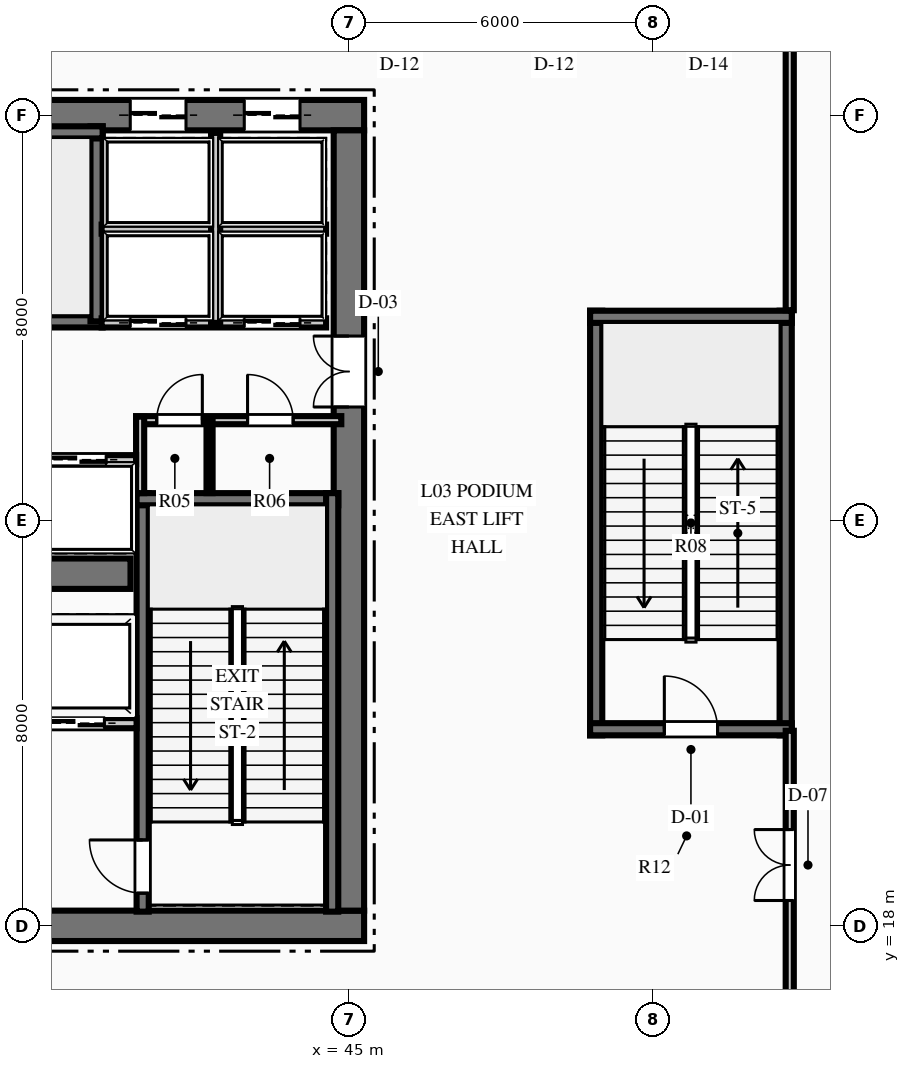
"""IFC4 building model, lengths in metres.
Left out: names, types, materials, properties, quantities, classifications, styles, units other than length and angle.
Written with IfcOpenShell. Run it as: python <this file> out.ifc"""

import sys

from ifc_helpers import new_model, si_unit, direction, frame, frame_2d, origin, place, context, subcontext, project, spatial, rectangle, extrude, element, fill, save


model = new_model("IFC4")
c1 = context("Model", 3, precision=1e-05, world=origin(), true_north=direction((0.0, 1.0)))
c2 = subcontext(c1, "Body", "Model", "MODEL_VIEW")
j1 = project(units=[si_unit("LENGTHUNIT", "METRE"), si_unit("PLANEANGLEUNIT", "RADIAN")], contexts=[c1])
p1 = place(None, origin())
s1 = spatial("IfcSite", under=j1, at=p1, CompositionType="ELEMENT")
p2 = place(p1, origin())
s2 = spatial("IfcBuilding", under=s1, at=p2, CompositionType="ELEMENT")
p3 = place(p2, frame((0.0, 0.0, 16.8)))
s3 = spatial("IfcBuildingStorey", under=s2, at=p3, CompositionType="ELEMENT", Elevation=16.8)
p4 = place(p3, frame((26.7, 18.0, 0.0), z_axis=(0.0, 0.0, 1.0), x_axis=(1.0, 0.0, 0.0)))
e1 = element("IfcWall", 1, at=p4, inside=s3, PredefinedType="SHEAR", context=c2, shape_type="SweptSolid", body=[
    extrude(rectangle(XDim=18.6, YDim=0.6, at=frame_2d((9.3, 0.0))), origin(), (0.0, 0.0, 1.0), 5.4),
])
p5 = place(p4, frame((7.4, 0.0, 0.0)))
e2 = element("IfcOpeningElement", 2, at=p5, cuts=e1, PredefinedType="OPENING", context=c2, shape_type="SweptSolid", body=[
    extrude(rectangle(XDim=1.1, YDim=2.15, at=frame_2d((0.55, 1.075))), frame((0.0, 0.31, 0.0), z_axis=(0.0, -1.0, 0.0), x_axis=(1.0, 0.0, 0.0)), (0.0, 0.0, 1.0), 0.62),
])
p6 = place(p4, frame((10.1, 0.0, 0.0)))
e3 = element("IfcOpeningElement", 3, at=p6, cuts=e1, PredefinedType="OPENING", context=c2, shape_type="SweptSolid", body=[
    extrude(rectangle(XDim=1.1, YDim=2.15, at=frame_2d((0.55, 1.075))), frame((0.0, 0.31, 0.0), z_axis=(0.0, -1.0, 0.0), x_axis=(1.0, 0.0, 0.0)), (0.0, 0.0, 1.0), 0.62),
])
p7 = place(p3, frame((26.7, 34.0, 0.0), z_axis=(0.0, 0.0, 1.0), x_axis=(1.0, 0.0, 0.0)))
e4 = element("IfcWall", 4, at=p7, inside=s3, PredefinedType="SHEAR", context=c2, shape_type="SweptSolid", body=[
    extrude(rectangle(XDim=18.6, YDim=0.6, at=frame_2d((9.3, 0.0))), origin(), (0.0, 0.0, 1.0), 5.4),
])
p8 = place(p7, frame((1.265, 0.0, 0.0)))
e5 = element("IfcOpeningElement", 5, at=p8, cuts=e4, PredefinedType="OPENING", context=c2, shape_type="SweptSolid", body=[
    extrude(rectangle(XDim=1.1, YDim=2.15, at=frame_2d((0.55, 1.075))), frame((0.0, 0.31, 0.0), z_axis=(0.0, -1.0, 0.0), x_axis=(1.0, 0.0, 0.0)), (0.0, 0.0, 1.0), 0.62),
])
p9 = place(p7, frame((3.515, 0.0, 0.0)))
e6 = element("IfcOpeningElement", 6, at=p9, cuts=e4, PredefinedType="OPENING", context=c2, shape_type="SweptSolid", body=[
    extrude(rectangle(XDim=1.1, YDim=2.15, at=frame_2d((0.55, 1.075))), frame((0.0, 0.31, 0.0), z_axis=(0.0, -1.0, 0.0), x_axis=(1.0, 0.0, 0.0)), (0.0, 0.0, 1.0), 0.62),
])
p10 = place(p7, frame((13.985, 0.0, 0.0)))
e7 = element("IfcOpeningElement", 7, at=p10, cuts=e4, PredefinedType="OPENING", context=c2, shape_type="SweptSolid", body=[
    extrude(rectangle(XDim=1.1, YDim=2.15, at=frame_2d((0.55, 1.075))), frame((0.0, 0.31, 0.0), z_axis=(0.0, -1.0, 0.0), x_axis=(1.0, 0.0, 0.0)), (0.0, 0.0, 1.0), 0.62),
])
p11 = place(p7, frame((16.235, 0.0, 0.0)))
e8 = element("IfcOpeningElement", 8, at=p11, cuts=e4, PredefinedType="OPENING", context=c2, shape_type="SweptSolid", body=[
    extrude(rectangle(XDim=1.1, YDim=2.15, at=frame_2d((0.55, 1.075))), frame((0.0, 0.31, 0.0), z_axis=(0.0, -1.0, 0.0), x_axis=(1.0, 0.0, 0.0)), (0.0, 0.0, 1.0), 0.62),
])
p12 = place(p3, frame((45.0, 18.3, 0.0), z_axis=(0.0, 0.0, 1.0), x_axis=(0.0, 1.0, 0.0)))
e9 = element("IfcWall", 9, at=p12, inside=s3, PredefinedType="SHEAR", context=c2, shape_type="SweptSolid", body=[
    extrude(rectangle(XDim=15.4, YDim=0.6, at=frame_2d((7.7, 0.0))), origin(), (0.0, 0.0, 1.0), 5.4),
])
p13 = place(p12, frame((9.94, 0.0, 0.0)))
e10 = element("IfcOpeningElement", 10, at=p13, cuts=e9, PredefinedType="OPENING", context=c2, shape_type="SweptSolid", body=[
    extrude(rectangle(XDim=1.4, YDim=2.2, at=frame_2d((0.7, 1.1))), frame((0.0, 0.31, 0.0), z_axis=(0.0, -1.0, 0.0), x_axis=(1.0, 0.0, 0.0)), (0.0, 0.0, 1.0), 0.62),
])
p14 = place(p3, frame((31.31, 24.95, 0.0), z_axis=(0.0, 0.0, 1.0), x_axis=(1.0, 0.0, 0.0)))
e11 = element("IfcWall", 11, at=p14, inside=s3, PredefinedType="SHEAR", context=c2, shape_type="SweptSolid", body=[
    extrude(rectangle(XDim=9.38, YDim=0.6, at=frame_2d((4.69, 0.0))), origin(), (0.0, 0.0, 1.0), 5.4),
])
p15 = place(p3, frame((40.93, 18.28, 0.0), z_axis=(0.0, 0.0, 1.0), x_axis=(0.0, 1.0, 0.0)))
e12 = element("IfcWall", 12, at=p15, inside=s3, PredefinedType="SHEAR", context=c2, shape_type="SweptSolid", body=[
    extrude(rectangle(XDim=8.26, YDim=0.24, at=frame_2d((4.13, 0.0))), origin(), (0.0, 0.0, 1.0), 5.4),
])
p16 = place(p15, frame((0.365, 0.0, 0.0)))
e13 = element("IfcOpeningElement", 13, at=p16, cuts=e12, PredefinedType="OPENING", context=c2, shape_type="SweptSolid", body=[
    extrude(rectangle(XDim=1.05, YDim=2.15, at=frame_2d((0.525, 1.075))), frame((0.0, 0.13, 0.0), z_axis=(0.0, -1.0, 0.0), x_axis=(1.0, 0.0, 0.0)), (0.0, 0.0, 1.0), 0.26),
])
p17 = place(p3, frame((40.81, 26.42, 0.0), z_axis=(0.0, 0.0, 1.0), x_axis=(1.0, 0.0, 0.0)))
e14 = element("IfcWall", 14, at=p17, inside=s3, PredefinedType="SHEAR", context=c2, shape_type="SweptSolid", body=[
    extrude(rectangle(XDim=3.98, YDim=0.24, at=frame_2d((1.99, 0.0))), origin(), (0.0, 0.0, 1.0), 5.4),
])
p18 = place(p3, frame((44.67, 18.28, 0.0), z_axis=(0.0, 0.0, 1.0), x_axis=(0.0, 1.0, 0.0)))
e15 = element("IfcWall", 15, at=p18, inside=s3, PredefinedType="SHEAR", context=c2, shape_type="SweptSolid", body=[
    extrude(rectangle(XDim=8.26, YDim=0.24, at=frame_2d((4.13, 0.0))), origin(), (0.0, 0.0, 1.0), 5.4),
])
p19 = place(p3, frame((31.76, 29.93, 0.0), z_axis=(0.0, 0.0, 1.0), x_axis=(1.0, 0.0, 0.0)))
e16 = element("IfcWall", 16, at=p19, inside=s3, PredefinedType="SHEAR", context=c2, shape_type="SweptSolid", body=[
    extrude(rectangle(XDim=8.38, YDim=0.24, at=frame_2d((4.19, 0.0))), origin(), (0.0, 0.0, 1.0), 5.4),
])
p20 = place(p19, frame((0.565, 0.0, 0.0)))
e17 = element("IfcOpeningElement", 17, at=p20, cuts=e16, PredefinedType="OPENING", context=c2, shape_type="SweptSolid", body=[
    extrude(rectangle(XDim=1.05, YDim=2.15, at=frame_2d((0.525, 1.075))), frame((0.0, 0.13, 0.0), z_axis=(0.0, -1.0, 0.0), x_axis=(1.0, 0.0, 0.0)), (0.0, 0.0, 1.0), 0.26),
])
p21 = place(p3, frame((40.02, 29.93, 0.0), z_axis=(0.0, 0.0, 1.0), x_axis=(0.0, 1.0, 0.0)))
e18 = element("IfcWall", 18, at=p21, inside=s3, PredefinedType="SHEAR", context=c2, shape_type="SweptSolid", body=[
    extrude(rectangle(XDim=3.85, YDim=0.24, at=frame_2d((1.925, 0.0))), origin(), (0.0, 0.0, 1.0), 5.4),
])
p22 = place(p3, frame((37.85, 33.66, 0.0), z_axis=(0.0, 0.0, 1.0), x_axis=(1.0, 0.0, 0.0)))
e19 = element("IfcWall", 19, at=p22, inside=s3, PredefinedType="SHEAR", context=c2, shape_type="SweptSolid", body=[
    extrude(rectangle(XDim=2.29, YDim=0.24, at=frame_2d((1.145, 0.0))), origin(), (0.0, 0.0, 1.0), 5.4),
])
for number, where, z_axis, x_axis in (
    (20, (49.88, 21.76, 0.0), (0.0, 0.0, 1.0), (0.0, 1.0, 0.0)),
    (21, (53.62, 21.76, 0.0), (0.0, 0.0, 1.0), (0.0, 1.0, 0.0)),
):
    element("IfcWall", number, at=place(p3, frame(where, z_axis=z_axis, x_axis=x_axis)), inside=s3, PredefinedType="SHEAR", context=c2, shape_type="SweptSolid", body=[
        extrude(rectangle(XDim=8.38, YDim=0.24, at=frame_2d((4.19, 0.0))), origin(), (0.0, 0.0, 1.0), 5.4),
    ])
p23 = place(p3, frame((49.76, 21.88, 0.0), z_axis=(0.0, 0.0, 1.0), x_axis=(1.0, 0.0, 0.0)))
e22 = element("IfcWall", 22, at=p23, inside=s3, PredefinedType="SHEAR", context=c2, shape_type="SweptSolid", body=[
    extrude(rectangle(XDim=3.98, YDim=0.24, at=frame_2d((1.99, 0.0))), origin(), (0.0, 0.0, 1.0), 5.4),
])
p24 = place(p23, frame((1.465, 0.0, 0.0)))
e23 = element("IfcOpeningElement", 23, at=p24, cuts=e22, PredefinedType="OPENING", context=c2, shape_type="SweptSolid", body=[
    extrude(rectangle(XDim=1.05, YDim=2.15, at=frame_2d((0.525, 1.075))), frame((0.0, 0.13, 0.0), z_axis=(0.0, -1.0, 0.0), x_axis=(1.0, 0.0, 0.0)), (0.0, 0.0, 1.0), 0.26),
])
p25 = place(p3, frame((49.76, 30.02, 0.0), z_axis=(0.0, 0.0, 1.0), x_axis=(1.0, 0.0, 0.0)))
e24 = element("IfcWall", 24, at=p25, inside=s3, PredefinedType="SHEAR", context=c2, shape_type="SweptSolid", body=[
    extrude(rectangle(XDim=3.98, YDim=0.24, at=frame_2d((1.99, 0.0))), origin(), (0.0, 0.0, 1.0), 5.4),
])
p26 = place(p3, frame((36.12, 22.0, 0.0), z_axis=(0.0, 0.0, 1.0), x_axis=(1.0, 0.0, 0.0)))
e25 = element("IfcWall", 25, at=p26, inside=s3, PredefinedType="PARTITIONING", context=c2, shape_type="SweptSolid", body=[
    extrude(rectangle(XDim=4.69, YDim=0.2, at=frame_2d((2.345, 0.0))), origin(), (0.0, 0.0, 1.0), 4.98),
])
p27 = place(p26, frame((2.955, 0.0, 0.0)))
e26 = element("IfcOpeningElement", 26, at=p27, cuts=e25, PredefinedType="OPENING", context=c2, shape_type="SweptSolid", body=[
    extrude(rectangle(XDim=1.1, YDim=2.15, at=frame_2d((0.55, 1.075))), frame((0.0, 0.11, 0.0), z_axis=(0.0, -1.0, 0.0), x_axis=(1.0, 0.0, 0.0)), (0.0, 0.0, 1.0), 0.22),
])
p28 = place(p26, frame((0.08, 0.0, 0.0)))
e27 = element("IfcOpeningElement", 27, at=p28, cuts=e25, PredefinedType="OPENING", context=c2, shape_type="SweptSolid", body=[
    extrude(rectangle(XDim=1.4, YDim=2.2, at=frame_2d((0.7, 1.1))), frame((0.0, 0.11, 0.0), z_axis=(0.0, -1.0, 0.0), x_axis=(1.0, 0.0, 0.0)), (0.0, 0.0, 1.0), 0.22),
])
p29 = place(p3, frame((40.8, 27.98, 0.0), z_axis=(0.0, 0.0, 1.0), x_axis=(1.0, 0.0, 0.0)))
e28 = element("IfcWall", 28, at=p29, inside=s3, PredefinedType="PARTITIONING", context=c2, shape_type="SweptSolid", body=[
    extrude(rectangle(XDim=4.05, YDim=0.16, at=frame_2d((2.025, 0.0))), origin(), (0.0, 0.0, 1.0), 4.98),
])
p30 = place(p29, frame((0.407, 0.0, 0.0)))
e29 = element("IfcOpeningElement", 29, at=p30, cuts=e28, PredefinedType="OPENING", context=c2, shape_type="SweptSolid", body=[
    extrude(rectangle(XDim=0.9, YDim=2.15, at=frame_2d((0.45, 1.075))), frame((0.0, 0.09, 0.0), z_axis=(0.0, -1.0, 0.0), x_axis=(1.0, 0.0, 0.0)), (0.0, 0.0, 1.0), 0.18),
])
p31 = place(p29, frame((2.2, 0.0, 0.0)))
e30 = element("IfcOpeningElement", 30, at=p31, cuts=e28, PredefinedType="OPENING", context=c2, shape_type="SweptSolid", body=[
    extrude(rectangle(XDim=0.9, YDim=2.15, at=frame_2d((0.45, 1.075))), frame((0.0, 0.09, 0.0), z_axis=(0.0, -1.0, 0.0), x_axis=(1.0, 0.0, 0.0)), (0.0, 0.0, 1.0), 0.18),
])
p32 = place(p3, frame((40.88, 26.54, 0.0), z_axis=(0.0, 0.0, 1.0), x_axis=(0.0, 1.0, 0.0)))
e31 = element("IfcWall", 31, at=p32, inside=s3, PredefinedType="PARTITIONING", context=c2, shape_type="SweptSolid", body=[
    extrude(rectangle(XDim=1.51, YDim=0.16, at=frame_2d((0.755, 0.0))), origin(), (0.0, 0.0, 1.0), 4.98),
])
p33 = place(p3, frame((42.25, 26.54, 0.0), z_axis=(0.0, 0.0, 1.0), x_axis=(0.0, 1.0, 0.0)))
e32 = element("IfcWall", 32, at=p33, inside=s3, PredefinedType="PARTITIONING", context=c2, shape_type="SweptSolid", body=[
    extrude(rectangle(XDim=1.44, YDim=0.12, at=frame_2d((0.72, 0.0))), origin(), (0.0, 0.0, 1.0), 4.98),
])
p34 = place(p3, frame((40.12, 29.9, 0.0), z_axis=(0.0, 0.0, 1.0), x_axis=(1.0, 0.0, 0.0)))
e33 = element("IfcWall", 33, at=p34, inside=s3, PredefinedType="PARTITIONING", context=c2, shape_type="SweptSolid", body=[
    extrude(rectangle(XDim=4.43, YDim=0.18, at=frame_2d((2.215, 0.0))), origin(), (0.0, 0.0, 1.0), 4.98),
])
p35 = place(p34, frame((0.565, 0.0, 0.0)))
e34 = element("IfcOpeningElement", 34, at=p35, cuts=e33, PredefinedType="OPENING", context=c2, shape_type="SweptSolid", body=[
    extrude(rectangle(XDim=1.1, YDim=2.15, at=frame_2d((0.55, 1.075))), frame((0.0, 0.1, 0.0), z_axis=(0.0, -1.0, 0.0), x_axis=(1.0, 0.0, 0.0)), (0.0, 0.0, 1.0), 0.2),
])
p36 = place(p34, frame((2.815, 0.0, 0.0)))
e35 = element("IfcOpeningElement", 35, at=p36, cuts=e33, PredefinedType="OPENING", context=c2, shape_type="SweptSolid", body=[
    extrude(rectangle(XDim=1.1, YDim=2.15, at=frame_2d((0.55, 1.075))), frame((0.0, 0.1, 0.0), z_axis=(0.0, -1.0, 0.0), x_axis=(1.0, 0.0, 0.0)), (0.0, 0.0, 1.0), 0.2),
])
p37 = place(p3, frame((40.12, 31.75, 0.0), z_axis=(0.0, 0.0, 1.0), x_axis=(1.0, 0.0, 0.0)))
e36 = element("IfcWall", 36, at=p37, inside=s3, PredefinedType="PARTITIONING", context=c2, shape_type="SweptSolid", body=[
    extrude(rectangle(XDim=4.43, YDim=0.18, at=frame_2d((2.215, 0.0))), origin(), (0.0, 0.0, 1.0), 4.98),
])
p38 = place(p3, frame((42.37, 29.9, 0.0), z_axis=(0.0, 0.0, 1.0), x_axis=(0.0, 1.0, 0.0)))
e37 = element("IfcWall", 37, at=p38, inside=s3, PredefinedType="PARTITIONING", context=c2, shape_type="SweptSolid", body=[
    extrude(rectangle(XDim=3.75, YDim=0.18, at=frame_2d((1.875, 0.0))), origin(), (0.0, 0.0, 1.0), 4.98),
])
p39 = place(p3, frame((31.2, 27.2, 0.0), z_axis=(0.0, 0.0, 1.0), x_axis=(1.0, 0.0, 0.0)))
e38 = element("IfcWall", 38, at=p39, inside=s3, PredefinedType="PARTITIONING", context=c2, shape_type="SweptSolid", body=[
    extrude(rectangle(XDim=9.6, YDim=0.18, at=frame_2d((4.8, 0.0))), origin(), (0.0, 0.0, 1.0), 4.98),
])
p40 = place(p39, frame((0.59, 0.0, 0.0)))
e39 = element("IfcOpeningElement", 39, at=p40, cuts=e38, PredefinedType="OPENING", context=c2, shape_type="SweptSolid", body=[
    extrude(rectangle(XDim=1.1, YDim=2.15, at=frame_2d((0.55, 1.075))), frame((0.0, 0.1, 0.0), z_axis=(0.0, -1.0, 0.0), x_axis=(1.0, 0.0, 0.0)), (0.0, 0.0, 1.0), 0.2),
])
p41 = place(p39, frame((2.99, 0.0, 0.0)))
e40 = element("IfcOpeningElement", 40, at=p41, cuts=e38, PredefinedType="OPENING", context=c2, shape_type="SweptSolid", body=[
    extrude(rectangle(XDim=1.1, YDim=2.15, at=frame_2d((0.55, 1.075))), frame((0.0, 0.1, 0.0), z_axis=(0.0, -1.0, 0.0), x_axis=(1.0, 0.0, 0.0)), (0.0, 0.0, 1.0), 0.2),
])
p42 = place(p39, frame((5.51, 0.0, 0.0)))
e41 = element("IfcOpeningElement", 41, at=p42, cuts=e38, PredefinedType="OPENING", context=c2, shape_type="SweptSolid", body=[
    extrude(rectangle(XDim=1.1, YDim=2.15, at=frame_2d((0.55, 1.075))), frame((0.0, 0.1, 0.0), z_axis=(0.0, -1.0, 0.0), x_axis=(1.0, 0.0, 0.0)), (0.0, 0.0, 1.0), 0.2),
])
p43 = place(p39, frame((7.91, 0.0, 0.0)))
e42 = element("IfcOpeningElement", 42, at=p43, cuts=e38, PredefinedType="OPENING", context=c2, shape_type="SweptSolid", body=[
    extrude(rectangle(XDim=1.1, YDim=2.15, at=frame_2d((0.55, 1.075))), frame((0.0, 0.1, 0.0), z_axis=(0.0, -1.0, 0.0), x_axis=(1.0, 0.0, 0.0)), (0.0, 0.0, 1.0), 0.2),
])
p44 = place(p3, frame((53.7, 15.3, 0.0), z_axis=(0.0, 0.0, 1.0), x_axis=(0.0, 1.0, 0.0)))
e43 = element("IfcWall", 43, at=p44, inside=s3, PredefinedType="PARTITIONING", context=c2, shape_type="SweptSolid", body=[
    extrude(rectangle(XDim=6.55, YDim=0.16, at=frame_2d((3.275, 0.0))), origin(), (0.0, 0.0, 1.0), 4.98),
])
p45 = place(p44, frame((3.2, 0.0, 0.0)))
e44 = element("IfcOpeningElement", 44, at=p45, cuts=e43, PredefinedType="OPENING", context=c2, shape_type="SweptSolid", body=[
    extrude(rectangle(XDim=1.4, YDim=2.2, at=frame_2d((0.7, 1.1))), frame((0.0, 0.09, 0.0), z_axis=(0.0, -1.0, 0.0), x_axis=(1.0, 0.0, 0.0)), (0.0, 0.0, 1.0), 0.18),
])
p46 = place(p3, frame((53.7, 30.15, 0.0), z_axis=(0.0, 0.0, 1.0), x_axis=(0.0, 1.0, 0.0)))
e45 = element("IfcWall", 45, at=p46, inside=s3, PredefinedType="PARTITIONING", context=c2, shape_type="SweptSolid", body=[
    extrude(rectangle(XDim=6.55, YDim=0.16, at=frame_2d((3.275, 0.0))), origin(), (0.0, 0.0, 1.0), 4.98),
])
p47 = place(p30, origin())
e46 = element("IfcDoor", 46, at=p47, inside=s3, OperationType="SINGLE_SWING_RIGHT", PredefinedType="DOOR", context=c2, shape_type="SweptSolid", body=[
    extrude(rectangle(XDim=0.9, YDim=2.15, at=frame_2d((0.45, 1.075))), frame((0.0, 0.025, 0.0), z_axis=(0.0, -1.0, 0.0), x_axis=(1.0, 0.0, 0.0)), (0.0, 0.0, 1.0), 0.05),
])
fill(e29, e46)
p48 = place(p31, origin())
e47 = element("IfcDoor", 47, at=p48, inside=s3, OperationType="SINGLE_SWING_LEFT", PredefinedType="DOOR", context=c2, shape_type="SweptSolid", body=[
    extrude(rectangle(XDim=0.9, YDim=2.15, at=frame_2d((0.45, 1.075))), frame((0.0, 0.025, 0.0), z_axis=(0.0, -1.0, 0.0), x_axis=(1.0, 0.0, 0.0)), (0.0, 0.0, 1.0), 0.05),
])
fill(e30, e47)
p49 = place(p16, origin())
e48 = element("IfcDoor", 48, at=p49, inside=s3, OperationType="SINGLE_SWING_RIGHT", PredefinedType="DOOR", context=c2, shape_type="SweptSolid", body=[
    extrude(rectangle(XDim=1.05, YDim=2.15, at=frame_2d((0.525, 1.075))), frame((0.0, 0.025, 0.0), z_axis=(0.0, -1.0, 0.0), x_axis=(1.0, 0.0, 0.0)), (0.0, 0.0, 1.0), 0.05),
])
fill(e13, e48)
p50 = place(p13, origin())
e49 = element("IfcDoor", 49, at=p50, inside=s3, OperationType="DOUBLE_DOOR_SINGLE_SWING", PredefinedType="DOOR", context=c2, shape_type="SweptSolid", body=[
    extrude(rectangle(XDim=1.4, YDim=2.2, at=frame_2d((0.7, 1.1))), frame((0.0, 0.025, 0.0), z_axis=(0.0, -1.0, 0.0), x_axis=(1.0, 0.0, 0.0)), (0.0, 0.0, 1.0), 0.05),
])
fill(e10, e49)
p51 = place(p24, origin())
e50 = element("IfcDoor", 50, at=p51, inside=s3, OperationType="SINGLE_SWING_LEFT", PredefinedType="DOOR", context=c2, shape_type="SweptSolid", body=[
    extrude(rectangle(XDim=1.05, YDim=2.15, at=frame_2d((0.525, 1.075))), frame((0.0, 0.025, 0.0), z_axis=(0.0, -1.0, 0.0), x_axis=(1.0, 0.0, 0.0)), (0.0, 0.0, 1.0), 0.05),
])
fill(e23, e50)
p52 = place(p45, origin())
e51 = element("IfcDoor", 51, at=p52, inside=s3, OperationType="DOUBLE_DOOR_SINGLE_SWING", PredefinedType="DOOR", context=c2, shape_type="SweptSolid", body=[
    extrude(rectangle(XDim=1.4, YDim=2.2, at=frame_2d((0.7, 1.1))), frame((0.0, 0.025, 0.0), z_axis=(0.0, -1.0, 0.0), x_axis=(1.0, 0.0, 0.0)), (0.0, 0.0, 1.0), 0.05),
])
fill(e44, e51)
p53 = place(p35, origin())
e52 = element("IfcDoor", 52, at=p53, inside=s3, OperationType="SLIDING_TO_LEFT", PredefinedType="DOOR", context=c2, shape_type="SweptSolid", body=[
    extrude(rectangle(XDim=1.1, YDim=2.15, at=frame_2d((0.55, 1.075))), frame((0.0, 0.025, 0.0), z_axis=(0.0, -1.0, 0.0), x_axis=(1.0, 0.0, 0.0)), (0.0, 0.0, 1.0), 0.05),
])
fill(e34, e52)
p54 = place(p36, origin())
e53 = element("IfcDoor", 53, at=p54, inside=s3, OperationType="SLIDING_TO_LEFT", PredefinedType="DOOR", context=c2, shape_type="SweptSolid", body=[
    extrude(rectangle(XDim=1.1, YDim=2.15, at=frame_2d((0.55, 1.075))), frame((0.0, 0.025, 0.0), z_axis=(0.0, -1.0, 0.0), x_axis=(1.0, 0.0, 0.0)), (0.0, 0.0, 1.0), 0.05),
])
fill(e35, e53)
p55 = place(p10, origin())
e54 = element("IfcDoor", 54, at=p55, inside=s3, OperationType="SLIDING_TO_LEFT", PredefinedType="DOOR", context=c2, shape_type="SweptSolid", body=[
    extrude(rectangle(XDim=1.1, YDim=2.15, at=frame_2d((0.55, 1.075))), frame((0.0, 0.025, 0.0), z_axis=(0.0, -1.0, 0.0), x_axis=(1.0, 0.0, 0.0)), (0.0, 0.0, 1.0), 0.05),
])
fill(e7, e54)
p56 = place(p11, origin())
e55 = element("IfcDoor", 55, at=p56, inside=s3, OperationType="SLIDING_TO_LEFT", PredefinedType="DOOR", context=c2, shape_type="SweptSolid", body=[
    extrude(rectangle(XDim=1.1, YDim=2.15, at=frame_2d((0.55, 1.075))), frame((0.0, 0.025, 0.0), z_axis=(0.0, -1.0, 0.0), x_axis=(1.0, 0.0, 0.0)), (0.0, 0.0, 1.0), 0.05),
])
fill(e8, e55)
p57 = place(p43, origin())
e56 = element("IfcDoor", 56, at=p57, inside=s3, OperationType="SLIDING_TO_LEFT", PredefinedType="DOOR", context=c2, shape_type="SweptSolid", body=[
    extrude(rectangle(XDim=1.1, YDim=2.15, at=frame_2d((0.55, 1.075))), frame((0.0, 0.025, 0.0), z_axis=(0.0, -1.0, 0.0), x_axis=(1.0, 0.0, 0.0)), (0.0, 0.0, 1.0), 0.05),
])
fill(e42, e56)
p58 = place(p27, origin())
e57 = element("IfcDoor", 57, at=p58, inside=s3, OperationType="SLIDING_TO_LEFT", PredefinedType="DOOR", context=c2, shape_type="SweptSolid", body=[
    extrude(rectangle(XDim=1.1, YDim=2.15, at=frame_2d((0.55, 1.075))), frame((0.0, 0.025, 0.0), z_axis=(0.0, -1.0, 0.0), x_axis=(1.0, 0.0, 0.0)), (0.0, 0.0, 1.0), 0.05),
])
fill(e26, e57)
save(model, sys.argv[1])
